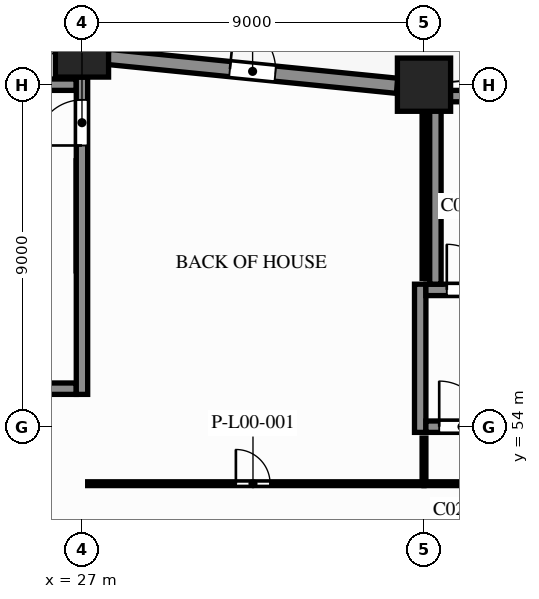
"""IFC4 building model, lengths in metres.
Left out: names, types, materials, properties, quantities, classifications, styles, units other than length and angle.
Written with IfcOpenShell. Run it as: python <this file> out.ifc"""

import sys

from ifc_helpers import new_model, si_unit, direction, frame, frame_2d, origin, origin_2d, place, context, subcontext, project, spatial, rectangle, extrude, element, fill, save


model = new_model("IFC4")
c1 = context("Model", 3, precision=1e-05, world=origin(), true_north=direction((0.0, 1.0)))
c2 = subcontext(c1, "Body", "Model", "MODEL_VIEW")
j1 = project(units=[si_unit("LENGTHUNIT", "METRE"), si_unit("PLANEANGLEUNIT", "RADIAN")], contexts=[c1])
p1 = place(None, origin())
s1 = spatial("IfcSite", under=j1, at=p1, CompositionType="ELEMENT")
p2 = place(p1, origin())
s2 = spatial("IfcBuilding", under=s1, at=p2, CompositionType="ELEMENT")
p3 = place(p2, origin())
s3 = spatial("IfcBuildingStorey", under=s2, at=p3, CompositionType="ELEMENT", Elevation=0.0)
for number, where, z_axis, x_axis in (
    (1, (36.0, 63.0, 0.0), (0.0, 0.0, 1.0), (1.0, 0.0, 0.0)),
    (2, (27.0, 63.9, 0.0), (0.0, 0.0, 1.0), (1.0, 0.0, 0.0)),
):
    element("IfcColumn", number, at=place(p3, frame(where, z_axis=z_axis, x_axis=x_axis)), inside=s3, PredefinedType="COLUMN", context=c2, shape_type="SweptSolid", body=[
        extrude(rectangle(XDim=1.4, YDim=1.4, at=origin_2d()), origin(), (0.0, 0.0, 1.0), 7.5),
    ])
p4 = place(p3, frame((27.687, 63.731, 0.0), z_axis=(0.0, 0.0, 1.0), x_axis=(0.995039719416, -0.099478423711, 0.0)))
e3 = element("IfcWall", 3, at=p4, inside=s3, PredefinedType="SOLIDWALL", context=c2, shape_type="SweptSolid", body=[
    extrude(rectangle(XDim=7.645, YDim=0.4, at=frame_2d((3.822, 0.0))), origin(), (0.0, 0.0, 1.0), 6.6),
])
p5 = place(p4, frame((3.222, 0.0, 0.0)))
e4 = element("IfcOpeningElement", 4, at=p5, cuts=e3, PredefinedType="OPENING", context=c2, shape_type="SweptSolid", body=[
    extrude(rectangle(XDim=1.2, YDim=2.4, at=frame_2d((0.6, 1.2))), frame((0.0, 0.21, 0.0), z_axis=(0.0, -1.0, 0.0), x_axis=(1.0, 0.0, 0.0)), (0.0, 0.0, 1.0), 0.42),
])
p6 = place(p3, frame((36.05, 54.0, 0.0), z_axis=(0.0, 0.0, 1.0), x_axis=(1.0, 0.0, 0.0)))
e5 = element("IfcWall", 5, at=p6, inside=s3, PredefinedType="SHEAR", context=c2, shape_type="SweptSolid", body=[
    extrude(rectangle(XDim=7.7, YDim=0.3, at=frame_2d((3.85, 0.0))), origin(), (0.0, 0.0, 1.0), 7.2),
])
p7 = place(p6, frame((0.35, 0.0, 0.0)))
e6 = element("IfcOpeningElement", 6, at=p7, cuts=e5, PredefinedType="OPENING", context=c2, shape_type="SweptSolid", body=[
    extrude(rectangle(XDim=1.2, YDim=2.2, at=frame_2d((0.6, 1.1))), frame((0.0, 0.16, 0.0), z_axis=(0.0, -1.0, 0.0), x_axis=(1.0, 0.0, 0.0)), (0.0, 0.0, 1.0), 0.32),
])
p8 = place(p3, frame((23.4, 55.0, 0.0), z_axis=(0.0, 0.0, 1.0), x_axis=(1.0, 0.0, 0.0)))
e7 = element("IfcWall", 7, at=p8, inside=s3, PredefinedType="SHEAR", context=c2, shape_type="SweptSolid", body=[
    extrude(rectangle(XDim=3.45, YDim=0.3, at=frame_2d((1.725, 0.0))), origin(), (0.0, 0.0, 1.0), 7.2),
])
p9 = place(p3, frame((36.05, 57.6, 0.0), z_axis=(0.0, 0.0, 1.0), x_axis=(1.0, 0.0, 0.0)))
e8 = element("IfcWall", 8, at=p9, inside=s3, PredefinedType="SHEAR", context=c2, shape_type="SweptSolid", body=[
    extrude(rectangle(XDim=7.7, YDim=0.3, at=frame_2d((3.85, 0.0))), origin(), (0.0, 0.0, 1.0), 7.2),
])
p10 = place(p9, frame((0.55, 0.0, 0.0)))
e9 = element("IfcOpeningElement", 9, at=p10, cuts=e8, PredefinedType="OPENING", context=c2, shape_type="SweptSolid", body=[
    extrude(rectangle(XDim=1.2, YDim=2.2, at=frame_2d((0.6, 1.1))), frame((0.0, 0.16, 0.0), z_axis=(0.0, -1.0, 0.0), x_axis=(1.0, 0.0, 0.0)), (0.0, 0.0, 1.0), 0.32),
])
p11 = place(p3, frame((36.45, 62.7, 0.0), z_axis=(0.0, 0.0, 1.0), x_axis=(1.0, 0.0, 0.0)))
e10 = element("IfcWall", 10, at=p11, inside=s3, PredefinedType="SHEAR", context=c2, shape_type="SweptSolid", body=[
    extrude(rectangle(XDim=4.9, YDim=0.3, at=frame_2d((2.45, 0.0))), origin(), (0.0, 0.0, 1.0), 7.2),
])
p12 = place(p11, frame((3.45, 0.0, 0.0)))
e11 = element("IfcOpeningElement", 11, at=p12, cuts=e10, PredefinedType="OPENING", context=c2, shape_type="SweptSolid", body=[
    extrude(rectangle(XDim=1.2, YDim=2.2, at=frame_2d((0.6, 1.1))), frame((0.0, 0.16, 0.0), z_axis=(0.0, -1.0, 0.0), x_axis=(1.0, 0.0, 0.0)), (0.0, 0.0, 1.0), 0.32),
])
p13 = place(p3, frame((23.55, 63.0, 0.0), z_axis=(0.0, 0.0, 1.0), x_axis=(1.0, 0.0, 0.0)))
e12 = element("IfcWall", 12, at=p13, inside=s3, PredefinedType="SHEAR", context=c2, shape_type="SweptSolid", body=[
    extrude(rectangle(XDim=3.3, YDim=0.3, at=frame_2d((1.65, 0.0))), origin(), (0.0, 0.0, 1.0), 7.2),
])
p14 = place(p13, frame((0.25, 0.0, 0.0)))
e13 = element("IfcOpeningElement", 13, at=p14, cuts=e12, PredefinedType="OPENING", context=c2, shape_type="SweptSolid", body=[
    extrude(rectangle(XDim=1.2, YDim=2.2, at=frame_2d((0.6, 1.1))), frame((0.0, 0.16, 0.0), z_axis=(0.0, -1.0, 0.0), x_axis=(1.0, 0.0, 0.0)), (0.0, 0.0, 1.0), 0.32),
])
p15 = place(p3, frame((27.0, 54.85, 0.0), z_axis=(0.0, 0.0, 1.0), x_axis=(0.0, 1.0, 0.0)))
e14 = element("IfcWall", 14, at=p15, inside=s3, PredefinedType="SHEAR", context=c2, shape_type="SweptSolid", body=[
    extrude(rectangle(XDim=8.35, YDim=0.3, at=frame_2d((4.175, 0.0))), origin(), (0.0, 0.0, 1.0), 7.2),
])
p16 = place(p15, frame((6.55, 0.0, 0.0)))
e15 = element("IfcOpeningElement", 15, at=p16, cuts=e14, PredefinedType="OPENING", context=c2, shape_type="SweptSolid", body=[
    extrude(rectangle(XDim=1.2, YDim=2.2, at=frame_2d((0.6, 1.1))), frame((0.0, 0.16, 0.0), z_axis=(0.0, -1.0, 0.0), x_axis=(1.0, 0.0, 0.0)), (0.0, 0.0, 1.0), 0.32),
])
p17 = place(p3, frame((35.9, 53.85, 0.0), z_axis=(0.0, 0.0, 1.0), x_axis=(0.0, 1.0, 0.0)))
e16 = element("IfcWall", 16, at=p17, inside=s3, PredefinedType="SHEAR", context=c2, shape_type="SweptSolid", body=[
    extrude(rectangle(XDim=3.9, YDim=0.3, at=frame_2d((1.95, 0.0))), origin(), (0.0, 0.0, 1.0), 7.2),
])
p18 = place(p3, frame((36.3, 57.75, 0.0), z_axis=(0.0, 0.0, 1.0), x_axis=(0.0, 1.0, 0.0)))
e17 = element("IfcWall", 17, at=p18, inside=s3, PredefinedType="SHEAR", context=c2, shape_type="SweptSolid", body=[
    extrude(rectangle(XDim=5.1, YDim=0.3, at=frame_2d((2.55, 0.0))), origin(), (0.0, 0.0, 1.0), 7.2),
])
p19 = place(p3, frame((27.15, 52.5, 0.0), z_axis=(0.0, 0.0, 1.0), x_axis=(1.0, 0.0, 0.0)))
e18 = element("IfcWall", 18, at=p19, inside=s3, PredefinedType="PARTITIONING", context=c2, shape_type="SweptSolid", body=[
    extrude(rectangle(XDim=8.85, YDim=0.1, at=frame_2d((4.425, 0.0))), origin(), (0.0, 0.0, 1.0), 6.48),
])
p20 = place(p19, frame((3.9, 0.0, 0.0)))
e19 = element("IfcOpeningElement", 19, at=p20, cuts=e18, PredefinedType="OPENING", context=c2, shape_type="SweptSolid", body=[
    extrude(rectangle(XDim=0.9, YDim=2.1, at=frame_2d((0.45, 1.05))), frame((0.0, 0.06, 0.0), z_axis=(0.0, -1.0, 0.0), x_axis=(1.0, 0.0, 0.0)), (0.0, 0.0, 1.0), 0.12),
])
p21 = place(p3, frame((36.0, 52.5, 0.0), z_axis=(0.0, 0.0, 1.0), x_axis=(1.0, 0.0, 0.0)))
e20 = element("IfcWall", 20, at=p21, inside=s3, PredefinedType="PARTITIONING", context=c2, shape_type="SweptSolid", body=[
    extrude(rectangle(XDim=9.0, YDim=0.1, at=frame_2d((4.5, 0.0))), origin(), (0.0, 0.0, 1.0), 6.48),
])
p22 = place(p21, frame((3.6, 0.0, 0.0)))
e21 = element("IfcOpeningElement", 21, at=p22, cuts=e20, PredefinedType="OPENING", context=c2, shape_type="SweptSolid", body=[
    extrude(rectangle(XDim=1.8, YDim=2.1, at=frame_2d((0.9, 1.05))), frame((0.0, 0.06, 0.0), z_axis=(0.0, -1.0, 0.0), x_axis=(1.0, 0.0, 0.0)), (0.0, 0.0, 1.0), 0.12),
])
p23 = place(p3, frame((36.0, 53.7, 0.0), z_axis=(0.0, 0.0, 1.0), x_axis=(0.0, -1.0, 0.0)))
e22 = element("IfcWall", 22, at=p23, inside=s3, PredefinedType="PARTITIONING", context=c2, shape_type="SweptSolid", body=[
    extrude(rectangle(XDim=1.15, YDim=0.1, at=frame_2d((0.575, 0.0))), origin(), (0.0, 0.0, 1.0), 6.48),
])
p24 = place(p3, frame((36.0, 62.28, 0.0), z_axis=(0.0, 0.0, 1.0), x_axis=(0.0, -1.0, 0.0)))
e23 = element("IfcWall", 23, at=p24, inside=s3, PredefinedType="PARTITIONING", context=c2, shape_type="SweptSolid", body=[
    extrude(rectangle(XDim=4.38, YDim=0.1, at=frame_2d((2.19, 0.0))), origin(), (0.0, 0.0, 1.0), 6.48),
])
p25 = place(p5, origin())
e24 = element("IfcDoor", 24, at=p25, inside=s3, OperationType="SINGLE_SWING_RIGHT", PredefinedType="DOOR", context=c2, shape_type="SweptSolid", body=[
    extrude(rectangle(XDim=1.2, YDim=2.4, at=frame_2d((0.6, 1.2))), frame((0.0, 0.025, 0.0), z_axis=(0.0, -1.0, 0.0), x_axis=(1.0, 0.0, 0.0)), (0.0, 0.0, 1.0), 0.05),
])
fill(e4, e24)
p26 = place(p16, origin())
e25 = element("IfcDoor", 25, at=p26, inside=s3, OperationType="SINGLE_SWING_LEFT", PredefinedType="DOOR", context=c2, shape_type="SweptSolid", body=[
    extrude(rectangle(XDim=1.2, YDim=2.2, at=frame_2d((0.6, 1.1))), frame((0.0, 0.025, 0.0), z_axis=(0.0, -1.0, 0.0), x_axis=(1.0, 0.0, 0.0)), (0.0, 0.0, 1.0), 0.05),
])
fill(e15, e25)
p27 = place(p7, origin())
e26 = element("IfcDoor", 26, at=p27, inside=s3, OperationType="SINGLE_SWING_LEFT", PredefinedType="DOOR", context=c2, shape_type="SweptSolid", body=[
    extrude(rectangle(XDim=1.2, YDim=2.2, at=frame_2d((0.6, 1.1))), frame((0.0, 0.025, 0.0), z_axis=(0.0, -1.0, 0.0), x_axis=(1.0, 0.0, 0.0)), (0.0, 0.0, 1.0), 0.05),
])
fill(e6, e26)
p28 = place(p10, origin())
e27 = element("IfcDoor", 27, at=p28, inside=s3, OperationType="SINGLE_SWING_RIGHT", PredefinedType="DOOR", context=c2, shape_type="SweptSolid", body=[
    extrude(rectangle(XDim=1.2, YDim=2.2, at=frame_2d((0.6, 1.1))), frame((0.0, 0.025, 0.0), z_axis=(0.0, -1.0, 0.0), x_axis=(1.0, 0.0, 0.0)), (0.0, 0.0, 1.0), 0.05),
])
fill(e9, e27)
p29 = place(p20, origin())
e28 = element("IfcDoor", 28, at=p29, inside=s3, OperationType="SINGLE_SWING_RIGHT", PredefinedType="DOOR", context=c2, shape_type="SweptSolid", body=[
    extrude(rectangle(XDim=0.9, YDim=2.1, at=frame_2d((0.45, 1.05))), frame((0.0, 0.025, 0.0), z_axis=(0.0, -1.0, 0.0), x_axis=(1.0, 0.0, 0.0)), (0.0, 0.0, 1.0), 0.05),
])
fill(e19, e28)
save(model, sys.argv[1])
